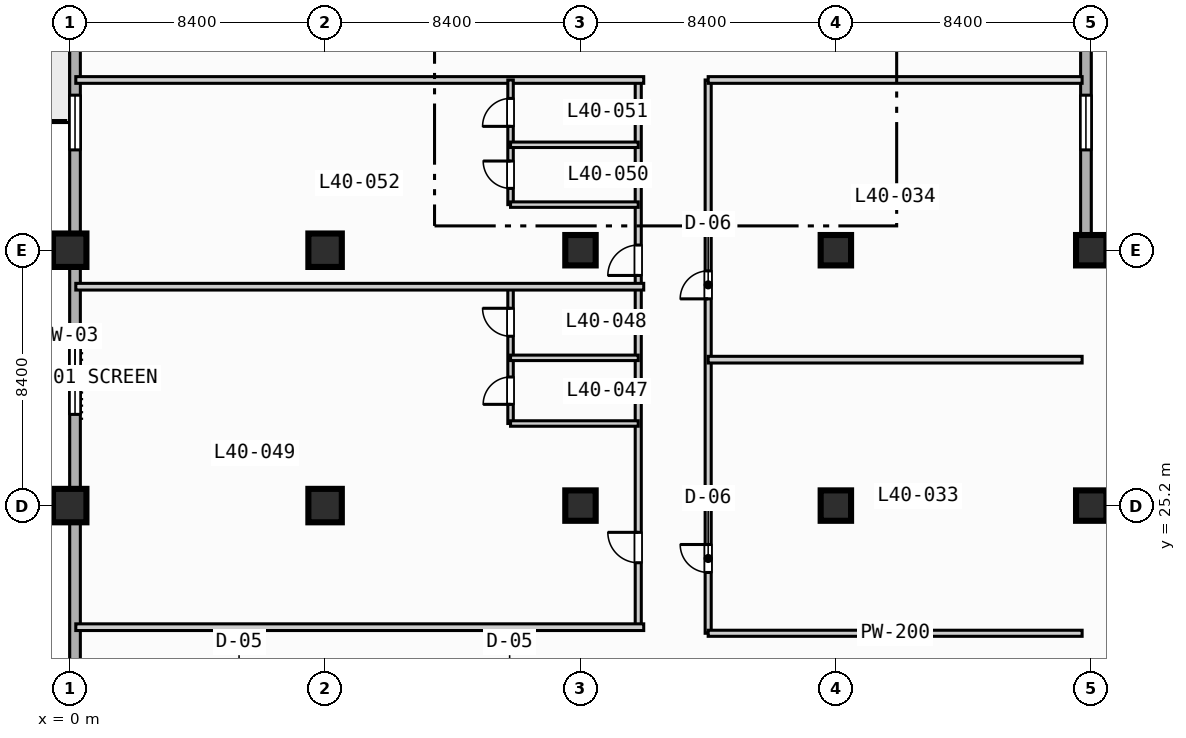
"""IFC4 building model, lengths in metres.
Left out: names, types, materials, properties, quantities, classifications, styles, units other than length and angle.
Written with IfcOpenShell. Run it as: python <this file> out.ifc"""

import sys

from ifc_helpers import new_model, si_unit, direction, frame, frame_2d, origin, origin_2d, place, context, subcontext, project, spatial, rectangle, extrude, element, fill, save


model = new_model("IFC4")
c1 = context("Model", 3, precision=1e-05, world=origin(), true_north=direction((0.0, 1.0)))
c2 = subcontext(c1, "Body", "Model", "MODEL_VIEW")
j1 = project(units=[si_unit("LENGTHUNIT", "METRE"), si_unit("PLANEANGLEUNIT", "RADIAN")], contexts=[c1])
p1 = place(None, origin())
s1 = spatial("IfcSite", under=j1, at=p1, CompositionType="ELEMENT")
p2 = place(p1, origin())
s2 = spatial("IfcBuilding", under=s1, at=p2, CompositionType="ELEMENT")
p3 = place(p2, frame((0.0, 0.0, 168.0)))
s3 = spatial("IfcBuildingStorey", under=s2, at=p3, CompositionType="ELEMENT", Elevation=168.0)
for number, where, z_axis, x_axis in (
    (1, (0.0, 25.2, 0.0), (0.0, 0.0, 1.0), (1.0, 0.0, 0.0)),
    (2, (0.0, 33.6, 0.0), (0.0, 0.0, 1.0), (1.0, 0.0, 0.0)),
    (3, (8.4, 25.2, 0.0), (0.0, 0.0, 1.0), (1.0, 0.0, 0.0)),
    (4, (8.4, 33.6, 0.0), (0.0, 0.0, 1.0), (1.0, 0.0, 0.0)),
):
    element("IfcColumn", number, at=place(p3, frame(where, z_axis=z_axis, x_axis=x_axis)), inside=s3, PredefinedType="COLUMN", context=c2, shape_type="SweptSolid", body=[
        extrude(rectangle(XDim=1.1, YDim=1.1, at=origin_2d()), origin(), (0.0, 0.0, 1.0), 3.7),
    ])
for number, where, z_axis, x_axis in (
    (5, (16.8, 25.2, 0.0), (0.0, 0.0, 1.0), (1.0, 0.0, 0.0)),
    (6, (16.8, 33.6, 0.0), (0.0, 0.0, 1.0), (1.0, 0.0, 0.0)),
    (7, (25.2, 25.2, 0.0), (0.0, 0.0, 1.0), (1.0, 0.0, 0.0)),
    (8, (25.2, 33.6, 0.0), (0.0, 0.0, 1.0), (1.0, 0.0, 0.0)),
    (9, (33.6, 25.2, 0.0), (0.0, 0.0, 1.0), (1.0, 0.0, 0.0)),
    (10, (33.6, 33.6, 0.0), (0.0, 0.0, 1.0), (1.0, 0.0, 0.0)),
):
    element("IfcColumn", number, at=place(p3, frame(where, z_axis=z_axis, x_axis=x_axis)), inside=s3, PredefinedType="COLUMN", context=c2, shape_type="SweptSolid", body=[
        extrude(rectangle(XDim=1.0, YDim=1.0, at=origin_2d()), origin(), (0.0, 0.0, 1.0), 3.7),
    ])
p4 = place(p3, frame((0.175, 3.175, 0.0), z_axis=(0.0, 0.0, 1.0), x_axis=(0.0, 1.0, 0.0)))
e11 = element("IfcWall", 11, at=p4, inside=s3, PredefinedType="STANDARD", context=c2, shape_type="SweptSolid", body=[
    extrude(rectangle(XDim=69.25, YDim=0.35, at=frame_2d((34.625, 0.0))), origin(), (0.0, 0.0, 1.0), 3.47),
])
p5 = place(p4, frame((42.325, 0.0, 0.0)))
e12 = element("IfcOpeningElement", 12, at=p5, cuts=e11, PredefinedType="OPENING", context=c2, shape_type="SweptSolid", body=[
    extrude(rectangle(XDim=1.4, YDim=2.2, at=frame_2d((0.7, 1.1))), frame((0.0, 0.185, 0.0), z_axis=(0.0, -1.0, 0.0), x_axis=(1.0, 0.0, 0.0)), (0.0, 0.0, 1.0), 0.37),
])
p6 = place(p4, frame((25.025, 0.0, 0.85)))
e13 = element("IfcOpeningElement", 13, at=p6, cuts=e11, PredefinedType="OPENING", context=c2, shape_type="SweptSolid", body=[
    extrude(rectangle(XDim=2.4, YDim=1.95, at=frame_2d((1.2, 0.975))), frame((0.0, 0.185, 0.0), z_axis=(0.0, -1.0, 0.0), x_axis=(1.0, 0.0, 0.0)), (0.0, 0.0, 1.0), 0.37),
])
p7 = place(p4, frame((33.725, 0.0, 0.85)))
e14 = element("IfcOpeningElement", 14, at=p7, cuts=e11, PredefinedType="OPENING", context=c2, shape_type="SweptSolid", body=[
    extrude(rectangle(XDim=1.8, YDim=1.8, at=frame_2d((0.9, 0.9))), frame((0.0, 0.185, 0.0), z_axis=(0.0, -1.0, 0.0), x_axis=(1.0, 0.0, 0.0)), (0.0, 0.0, 1.0), 0.37),
])
p8 = place(p4, frame((58.625, 0.0, 0.85)))
e15 = element("IfcOpeningElement", 15, at=p8, cuts=e11, PredefinedType="OPENING", context=c2, shape_type="SweptSolid", body=[
    extrude(rectangle(XDim=2.4, YDim=1.95, at=frame_2d((1.2, 0.975))), frame((0.0, 0.185, 0.0), z_axis=(0.0, -1.0, 0.0), x_axis=(1.0, 0.0, 0.0)), (0.0, 0.0, 1.0), 0.37),
])
p9 = place(p3, frame((33.425, 72.425, 0.0), z_axis=(0.0, 0.0, 1.0), x_axis=(0.0, -1.0, 0.0)))
e16 = element("IfcWall", 16, at=p9, inside=s3, PredefinedType="STANDARD", context=c2, shape_type="SweptSolid", body=[
    extrude(rectangle(XDim=39.0, YDim=0.35, at=frame_2d((19.5, 0.0))), origin(), (0.0, 0.0, 1.0), 3.47),
])
p10 = place(p9, frame((33.725, 0.0, 0.85)))
e17 = element("IfcOpeningElement", 17, at=p10, cuts=e16, PredefinedType="OPENING", context=c2, shape_type="SweptSolid", body=[
    extrude(rectangle(XDim=1.8, YDim=1.8, at=frame_2d((0.9, 0.9))), frame((0.0, 0.185, 0.0), z_axis=(0.0, -1.0, 0.0), x_axis=(1.0, 0.0, 0.0)), (0.0, 0.0, 1.0), 0.37),
])
p11 = place(p9, frame((16.925, 0.0, 0.85)))
e18 = element("IfcOpeningElement", 18, at=p11, cuts=e16, PredefinedType="OPENING", context=c2, shape_type="SweptSolid", body=[
    extrude(rectangle(XDim=1.8, YDim=1.8, at=frame_2d((0.9, 0.9))), frame((0.0, 0.185, 0.0), z_axis=(0.0, -1.0, 0.0), x_axis=(1.0, 0.0, 0.0)), (0.0, 0.0, 1.0), 0.37),
])
p12 = place(p9, frame((8.225, 0.0, 0.85)))
e19 = element("IfcOpeningElement", 19, at=p12, cuts=e16, PredefinedType="OPENING", context=c2, shape_type="SweptSolid", body=[
    extrude(rectangle(XDim=2.4, YDim=1.95, at=frame_2d((1.2, 0.975))), frame((0.0, 0.185, 0.0), z_axis=(0.0, -1.0, 0.0), x_axis=(1.0, 0.0, 0.0)), (0.0, 0.0, 1.0), 0.37),
])
p13 = place(p3, frame((33.425, 33.425, 0.0), z_axis=(0.0, 0.0, 1.0), x_axis=(1.0, 0.0, 0.0)))
e20 = element("IfcWall", 20, at=p13, inside=s3, PredefinedType="STANDARD", context=c2, shape_type="SweptSolid", body=[
    extrude(rectangle(XDim=39.0, YDim=0.35, at=frame_2d((19.5, 0.0))), origin(), (0.0, 0.0, 1.0), 3.47),
])
p14 = place(p13, frame((12.075, 0.0, 0.0)))
e21 = element("IfcOpeningElement", 21, at=p14, cuts=e20, PredefinedType="OPENING", context=c2, shape_type="SweptSolid", body=[
    extrude(rectangle(XDim=1.4, YDim=2.2, at=frame_2d((0.7, 1.1))), frame((0.0, 0.185, 0.0), z_axis=(0.0, -1.0, 0.0), x_axis=(1.0, 0.0, 0.0)), (0.0, 0.0, 1.0), 0.37),
])
p15 = place(p13, frame((20.275, 0.0, 0.85)))
e22 = element("IfcOpeningElement", 22, at=p15, cuts=e20, PredefinedType="OPENING", context=c2, shape_type="SweptSolid", body=[
    extrude(rectangle(XDim=1.8, YDim=1.8, at=frame_2d((0.9, 0.9))), frame((0.0, 0.185, 0.0), z_axis=(0.0, -1.0, 0.0), x_axis=(1.0, 0.0, 0.0)), (0.0, 0.0, 1.0), 0.37),
])
p16 = place(p13, frame((28.375, 0.0, 0.85)))
e23 = element("IfcOpeningElement", 23, at=p16, cuts=e20, PredefinedType="OPENING", context=c2, shape_type="SweptSolid", body=[
    extrude(rectangle(XDim=2.4, YDim=1.95, at=frame_2d((1.2, 0.975))), frame((0.0, 0.185, 0.0), z_axis=(0.0, -1.0, 0.0), x_axis=(1.0, 0.0, 0.0)), (0.0, 0.0, 1.0), 0.37),
])
p17 = place(p3, frame((21.0, 21.0, 0.0), z_axis=(0.0, 0.0, 1.0), x_axis=(0.0, 1.0, 0.0)))
e24 = element("IfcWall", 24, at=p17, inside=s3, PredefinedType="PARTITIONING", context=c2, shape_type="SweptSolid", body=[
    extrude(rectangle(XDim=18.2, YDim=0.2, at=frame_2d((9.1, 0.0))), origin(), (0.0, 0.0, 1.0), 3.47),
])
p18 = place(p17, frame((2.0, 0.0, 0.0)))
e25 = element("IfcOpeningElement", 25, at=p18, cuts=e24, PredefinedType="OPENING", context=c2, shape_type="SweptSolid", body=[
    extrude(rectangle(XDim=0.92, YDim=2.1, at=frame_2d((0.46, 1.05))), frame((0.0, 0.11, 0.0), z_axis=(0.0, -1.0, 0.0), x_axis=(1.0, 0.0, 0.0)), (0.0, 0.0, 1.0), 0.22),
])
p19 = place(p17, frame((11.0, 0.0, 0.0)))
e26 = element("IfcOpeningElement", 26, at=p19, cuts=e24, PredefinedType="OPENING", context=c2, shape_type="SweptSolid", body=[
    extrude(rectangle(XDim=0.92, YDim=2.1, at=frame_2d((0.46, 1.05))), frame((0.0, 0.11, 0.0), z_axis=(0.0, -1.0, 0.0), x_axis=(1.0, 0.0, 0.0)), (0.0, 0.0, 1.0), 0.22),
])
p20 = place(p3, frame((21.0, 21.0, 0.0), z_axis=(0.0, 0.0, 1.0), x_axis=(1.0, 0.0, 0.0)))
e27 = element("IfcWall", 27, at=p20, inside=s3, PredefinedType="PARTITIONING", context=c2, shape_type="SweptSolid", body=[
    extrude(rectangle(XDim=12.3, YDim=0.2, at=frame_2d((6.15, 0.0))), origin(), (0.0, 0.0, 1.0), 3.47),
])
for number, where, z_axis, x_axis in (
    (28, (21.0, 30.0, 0.0), (0.0, 0.0, 1.0), (1.0, 0.0, 0.0)),
    (29, (21.0, 39.2, 0.0), (0.0, 0.0, 1.0), (1.0, 0.0, 0.0)),
):
    element("IfcWall", number, at=place(p3, frame(where, z_axis=z_axis, x_axis=x_axis)), inside=s3, PredefinedType="PARTITIONING", context=c2, shape_type="SweptSolid", body=[
        extrude(rectangle(XDim=12.3, YDim=0.22, at=frame_2d((6.15, 0.0))), origin(), (0.0, 0.0, 1.0), 3.47),
    ])
p21 = place(p3, frame((18.7, 21.2, 0.0), z_axis=(0.0, 0.0, 1.0), x_axis=(0.0, 1.0, 0.0)))
e30 = element("IfcWall", 30, at=p21, inside=s3, PredefinedType="PARTITIONING", context=c2, shape_type="SweptSolid", body=[
    extrude(rectangle(XDim=18.0, YDim=0.2, at=frame_2d((9.0, 0.0))), origin(), (0.0, 0.0, 1.0), 3.47),
])
p22 = place(p21, frame((2.12, 0.0, 0.0)))
e31 = element("IfcOpeningElement", 31, at=p22, cuts=e30, PredefinedType="OPENING", context=c2, shape_type="SweptSolid", body=[
    extrude(rectangle(XDim=1.0, YDim=2.15, at=frame_2d((0.5, 1.075))), frame((0.0, 0.11, 0.0), z_axis=(0.0, -1.0, 0.0), x_axis=(1.0, 0.0, 0.0)), (0.0, 0.0, 1.0), 0.22),
])
p23 = place(p21, frame((11.57, 0.0, 0.0)))
e32 = element("IfcOpeningElement", 32, at=p23, cuts=e30, PredefinedType="OPENING", context=c2, shape_type="SweptSolid", body=[
    extrude(rectangle(XDim=1.0, YDim=2.15, at=frame_2d((0.5, 1.075))), frame((0.0, 0.11, 0.0), z_axis=(0.0, -1.0, 0.0), x_axis=(1.0, 0.0, 0.0)), (0.0, 0.0, 1.0), 0.22),
])
p24 = place(p3, frame((0.2, 21.2, 0.0), z_axis=(0.0, 0.0, 1.0), x_axis=(1.0, 0.0, 0.0)))
e33 = element("IfcWall", 33, at=p24, inside=s3, PredefinedType="PARTITIONING", context=c2, shape_type="SweptSolid", body=[
    extrude(rectangle(XDim=18.68, YDim=0.22, at=frame_2d((9.34, 0.0))), origin(), (0.0, 0.0, 1.0), 3.47),
])
p25 = place(p3, frame((14.5, 27.9, 0.0), z_axis=(0.0, 0.0, 1.0), x_axis=(0.0, 1.0, 0.0)))
e34 = element("IfcWall", 34, at=p25, inside=s3, PredefinedType="PLUMBINGWALL", context=c2, shape_type="SweptSolid", body=[
    extrude(rectangle(XDim=4.5, YDim=0.18, at=frame_2d((2.25, 0.0))), origin(), (0.0, 0.0, 1.0), 3.47),
])
p26 = place(p25, frame((0.63, 0.0, 0.0)))
e35 = element("IfcOpeningElement", 35, at=p26, cuts=e34, PredefinedType="OPENING", context=c2, shape_type="SweptSolid", body=[
    extrude(rectangle(XDim=0.9, YDim=2.1, at=frame_2d((0.45, 1.05))), frame((0.0, 0.1, 0.0), z_axis=(0.0, -1.0, 0.0), x_axis=(1.0, 0.0, 0.0)), (0.0, 0.0, 1.0), 0.2),
])
p27 = place(p25, frame((2.87, 0.0, 0.0)))
e36 = element("IfcOpeningElement", 36, at=p27, cuts=e34, PredefinedType="OPENING", context=c2, shape_type="SweptSolid", body=[
    extrude(rectangle(XDim=0.92, YDim=2.1, at=frame_2d((0.46, 1.05))), frame((0.0, 0.1, 0.0), z_axis=(0.0, -1.0, 0.0), x_axis=(1.0, 0.0, 0.0)), (0.0, 0.0, 1.0), 0.2),
])
for number, where, z_axis, x_axis in (
    (37, (14.5, 27.9, 0.0), (0.0, 0.0, 1.0), (1.0, 0.0, 0.0)),
    (38, (14.5, 30.06, 0.0), (0.0, 0.0, 1.0), (1.0, 0.0, 0.0)),
):
    element("IfcWall", number, at=place(p3, frame(where, z_axis=z_axis, x_axis=x_axis)), inside=s3, PredefinedType="PLUMBINGWALL", context=c2, shape_type="SweptSolid", body=[
        extrude(rectangle(XDim=4.2, YDim=0.18, at=frame_2d((2.1, 0.0))), origin(), (0.0, 0.0, 1.0), 3.47),
    ])
for number, where, z_axis, x_axis in (
    (39, (0.2, 32.4, 0.0), (0.0, 0.0, 1.0), (1.0, 0.0, 0.0)),
    (40, (0.2, 39.2, 0.0), (0.0, 0.0, 1.0), (1.0, 0.0, 0.0)),
):
    element("IfcWall", number, at=place(p3, frame(where, z_axis=z_axis, x_axis=x_axis)), inside=s3, PredefinedType="PARTITIONING", context=c2, shape_type="SweptSolid", body=[
        extrude(rectangle(XDim=18.68, YDim=0.22, at=frame_2d((9.34, 0.0))), origin(), (0.0, 0.0, 1.0), 3.47),
    ])
p28 = place(p3, frame((14.5, 35.1, 0.0), z_axis=(0.0, 0.0, 1.0), x_axis=(0.0, 1.0, 0.0)))
e41 = element("IfcWall", 41, at=p28, inside=s3, PredefinedType="PLUMBINGWALL", context=c2, shape_type="SweptSolid", body=[
    extrude(rectangle(XDim=4.1, YDim=0.18, at=frame_2d((2.05, 0.0))), origin(), (0.0, 0.0, 1.0), 3.47),
])
p29 = place(p28, frame((0.534, 0.0, 0.0)))
e42 = element("IfcOpeningElement", 42, at=p29, cuts=e41, PredefinedType="OPENING", context=c2, shape_type="SweptSolid", body=[
    extrude(rectangle(XDim=0.9, YDim=2.1, at=frame_2d((0.45, 1.05))), frame((0.0, 0.1, 0.0), z_axis=(0.0, -1.0, 0.0), x_axis=(1.0, 0.0, 0.0)), (0.0, 0.0, 1.0), 0.2),
])
p30 = place(p28, frame((2.574, 0.0, 0.0)))
e43 = element("IfcOpeningElement", 43, at=p30, cuts=e41, PredefinedType="OPENING", context=c2, shape_type="SweptSolid", body=[
    extrude(rectangle(XDim=0.92, YDim=2.1, at=frame_2d((0.46, 1.05))), frame((0.0, 0.1, 0.0), z_axis=(0.0, -1.0, 0.0), x_axis=(1.0, 0.0, 0.0)), (0.0, 0.0, 1.0), 0.2),
])
for number, where, z_axis, x_axis in (
    (44, (14.5, 35.1, 0.0), (0.0, 0.0, 1.0), (1.0, 0.0, 0.0)),
    (45, (14.5, 37.068, 0.0), (0.0, 0.0, 1.0), (1.0, 0.0, 0.0)),
):
    element("IfcWall", number, at=place(p3, frame(where, z_axis=z_axis, x_axis=x_axis)), inside=s3, PredefinedType="PLUMBINGWALL", context=c2, shape_type="SweptSolid", body=[
        extrude(rectangle(XDim=4.2, YDim=0.18, at=frame_2d((2.1, 0.0))), origin(), (0.0, 0.0, 1.0), 3.47),
    ])
p31 = place(p6, origin())
e46 = element("IfcWindow", 46, at=p31, inside=s3, PartitioningType="SINGLE_PANEL", PredefinedType="WINDOW", context=c2, shape_type="SweptSolid", body=[
    extrude(rectangle(XDim=2.4, YDim=1.95, at=frame_2d((1.2, 0.975))), frame((0.0, 0.03, 0.0), z_axis=(0.0, -1.0, 0.0), x_axis=(1.0, 0.0, 0.0)), (0.0, 0.0, 1.0), 0.06),
])
fill(e13, e46)
p32 = place(p7, origin())
e47 = element("IfcWindow", 47, at=p32, inside=s3, PartitioningType="SINGLE_PANEL", PredefinedType="WINDOW", context=c2, shape_type="SweptSolid", body=[
    extrude(rectangle(XDim=1.8, YDim=1.8, at=frame_2d((0.9, 0.9))), frame((0.0, 0.03, 0.0), z_axis=(0.0, -1.0, 0.0), x_axis=(1.0, 0.0, 0.0)), (0.0, 0.0, 1.0), 0.06),
])
fill(e14, e47)
p33 = place(p10, origin())
e48 = element("IfcWindow", 48, at=p33, inside=s3, PartitioningType="SINGLE_PANEL", PredefinedType="WINDOW", context=c2, shape_type="SweptSolid", body=[
    extrude(rectangle(XDim=1.8, YDim=1.8, at=frame_2d((0.9, 0.9))), frame((0.0, 0.03, 0.0), z_axis=(0.0, -1.0, 0.0), x_axis=(1.0, 0.0, 0.0)), (0.0, 0.0, 1.0), 0.06),
])
fill(e17, e48)
p34 = place(p18, origin())
e49 = element("IfcDoor", 49, at=p34, inside=s3, OperationType="SINGLE_SWING_RIGHT", PredefinedType="DOOR", context=c2, shape_type="SweptSolid", body=[
    extrude(rectangle(XDim=0.92, YDim=2.1, at=frame_2d((0.46, 1.05))), frame((0.0, 0.025, 0.0), z_axis=(0.0, -1.0, 0.0), x_axis=(1.0, 0.0, 0.0)), (0.0, 0.0, 1.0), 0.05),
])
fill(e25, e49)
p35 = place(p19, origin())
e50 = element("IfcDoor", 50, at=p35, inside=s3, OperationType="SINGLE_SWING_LEFT", PredefinedType="DOOR", context=c2, shape_type="SweptSolid", body=[
    extrude(rectangle(XDim=0.92, YDim=2.1, at=frame_2d((0.46, 1.05))), frame((0.0, 0.025, 0.0), z_axis=(0.0, -1.0, 0.0), x_axis=(1.0, 0.0, 0.0)), (0.0, 0.0, 1.0), 0.05),
])
fill(e26, e50)
p36 = place(p22, origin())
e51 = element("IfcDoor", 51, at=p36, inside=s3, OperationType="SINGLE_SWING_RIGHT", PredefinedType="DOOR", context=c2, shape_type="SweptSolid", body=[
    extrude(rectangle(XDim=1.0, YDim=2.15, at=frame_2d((0.5, 1.075))), frame((0.0, 0.025, 0.0), z_axis=(0.0, -1.0, 0.0), x_axis=(1.0, 0.0, 0.0)), (0.0, 0.0, 1.0), 0.05),
])
fill(e31, e51)
p37 = place(p23, origin())
e52 = element("IfcDoor", 52, at=p37, inside=s3, OperationType="SINGLE_SWING_LEFT", PredefinedType="DOOR", context=c2, shape_type="SweptSolid", body=[
    extrude(rectangle(XDim=1.0, YDim=2.15, at=frame_2d((0.5, 1.075))), frame((0.0, 0.025, 0.0), z_axis=(0.0, -1.0, 0.0), x_axis=(1.0, 0.0, 0.0)), (0.0, 0.0, 1.0), 0.05),
])
fill(e32, e52)
p38 = place(p26, origin())
e53 = element("IfcDoor", 53, at=p38, inside=s3, OperationType="SINGLE_SWING_LEFT", PredefinedType="DOOR", context=c2, shape_type="SweptSolid", body=[
    extrude(rectangle(XDim=0.9, YDim=2.1, at=frame_2d((0.45, 1.05))), frame((0.0, 0.025, 0.0), z_axis=(0.0, -1.0, 0.0), x_axis=(1.0, 0.0, 0.0)), (0.0, 0.0, 1.0), 0.05),
])
fill(e35, e53)
p39 = place(p27, origin())
e54 = element("IfcDoor", 54, at=p39, inside=s3, OperationType="SINGLE_SWING_RIGHT", PredefinedType="DOOR", context=c2, shape_type="SweptSolid", body=[
    extrude(rectangle(XDim=0.92, YDim=2.1, at=frame_2d((0.46, 1.05))), frame((0.0, 0.025, 0.0), z_axis=(0.0, -1.0, 0.0), x_axis=(1.0, 0.0, 0.0)), (0.0, 0.0, 1.0), 0.05),
])
fill(e36, e54)
p40 = place(p29, origin())
e55 = element("IfcDoor", 55, at=p40, inside=s3, OperationType="SINGLE_SWING_RIGHT", PredefinedType="DOOR", context=c2, shape_type="SweptSolid", body=[
    extrude(rectangle(XDim=0.9, YDim=2.1, at=frame_2d((0.45, 1.05))), frame((0.0, 0.025, 0.0), z_axis=(0.0, -1.0, 0.0), x_axis=(1.0, 0.0, 0.0)), (0.0, 0.0, 1.0), 0.05),
])
fill(e42, e55)
p41 = place(p30, origin())
e56 = element("IfcDoor", 56, at=p41, inside=s3, OperationType="SINGLE_SWING_LEFT", PredefinedType="DOOR", context=c2, shape_type="SweptSolid", body=[
    extrude(rectangle(XDim=0.92, YDim=2.1, at=frame_2d((0.46, 1.05))), frame((0.0, 0.025, 0.0), z_axis=(0.0, -1.0, 0.0), x_axis=(1.0, 0.0, 0.0)), (0.0, 0.0, 1.0), 0.05),
])
fill(e43, e56)
save(model, sys.argv[1])
